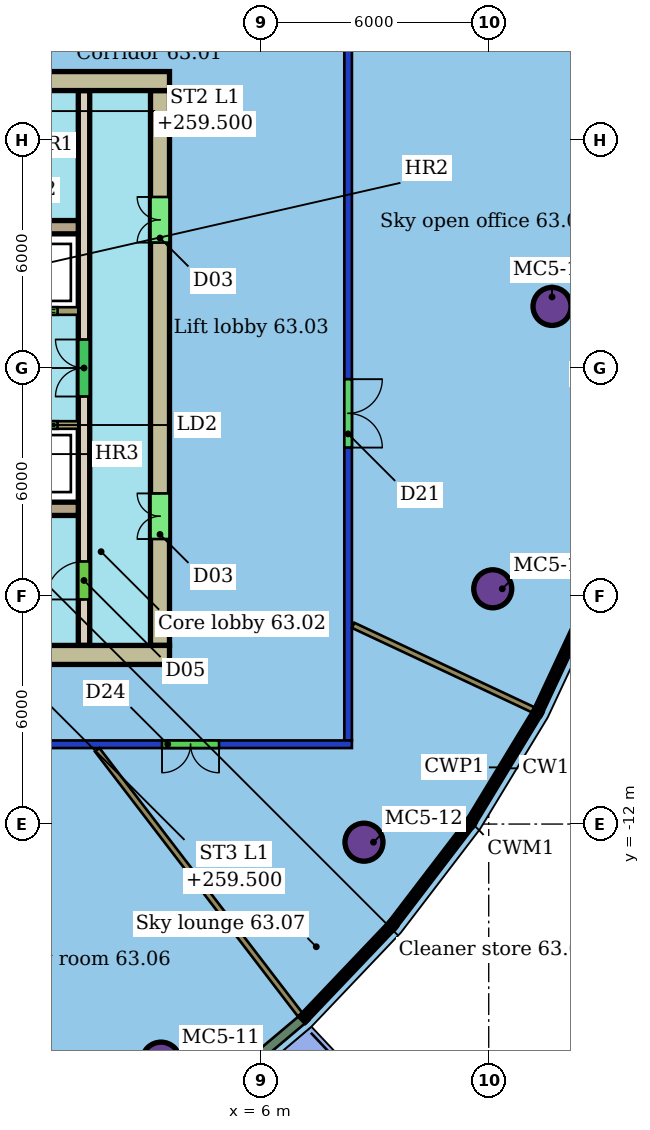
"""IFC4 building model, lengths in metres.
Left out: names, types, materials, properties, quantities, classifications, styles, units other than length and angle.
Written with IfcOpenShell. Run it as: python <this file> out.ifc"""

import sys

from ifc_helpers import new_model, si_unit, direction, frame, frame_2d, origin, origin_2d, place, context, subcontext, project, spatial, rectangle, hollow_circle, extrude, element, fill, save


model = new_model("IFC4")
c1 = context("Model", 3, precision=1e-05, world=origin(), true_north=direction((0.0, 1.0)))
c2 = subcontext(c1, "Body", "Model", "MODEL_VIEW")
j1 = project(units=[si_unit("LENGTHUNIT", "METRE"), si_unit("PLANEANGLEUNIT", "RADIAN")], contexts=[c1])
p1 = place(None, origin())
s1 = spatial("IfcSite", under=j1, at=p1, CompositionType="ELEMENT")
p2 = place(p1, origin())
s2 = spatial("IfcBuilding", under=s1, at=p2, CompositionType="ELEMENT")
p3 = place(p2, frame((0.0, 0.0, 257.7)))
s3 = spatial("IfcBuildingStorey", under=s2, at=p3, CompositionType="ELEMENT", Elevation=257.7)
for number, where, z_axis, x_axis in (
    (1, (3.377, -18.238, 0.0), (0.0, 0.0, 1.0), (1.0, 0.0, 0.0)),
    (2, (8.718, -12.477, 0.0), (0.0, 0.0, 1.0), (1.0, 0.0, 0.0)),
    (3, (12.106, -5.81, 0.0), (0.0, 0.0, 1.0), (1.0, 0.0, 0.0)),
    (4, (13.666, 1.62, 0.0), (0.0, 0.0, 1.0), (1.0, 0.0, 0.0)),
):
    element("IfcColumn", number, at=place(p3, frame(where, z_axis=z_axis, x_axis=x_axis)), inside=s3, PredefinedType="COLUMN", context=c2, shape_type="SweptSolid", body=[
        extrude(hollow_circle(Radius=0.5, WallThickness=0.04, at=origin_2d()), origin(), (0.0, 0.0, 1.0), 3.45),
    ])
p4 = place(p3, frame((8.4, -9.9, 0.0), z_axis=(0.0, 0.0, 1.0), x_axis=(-1.0, 0.0, 0.0)))
e5 = element("IfcWall", 5, at=p4, inside=s3, PredefinedType="PARTITIONING", context=c2, shape_type="SweptSolid", body=[
    extrude(rectangle(XDim=28.8, YDim=0.2, at=frame_2d((14.4, 0.0))), origin(), (0.0, 0.0, 1.0), 3.1),
])
p5 = place(p4, frame((23.159, 0.0, 0.0)))
e6 = element("IfcOpeningElement", 6, at=p5, cuts=e5, PredefinedType="OPENING", context=c2, shape_type="SweptSolid", body=[
    extrude(rectangle(XDim=1.8, YDim=2.4, at=frame_2d((0.9, 1.2))), frame((0.0, 0.11, 0.0), z_axis=(0.0, -1.0, 0.0), x_axis=(1.0, 0.0, 0.0)), (0.0, 0.0, 1.0), 0.22),
])
p6 = place(p4, frame((17.296, 0.0, 0.0)))
e7 = element("IfcOpeningElement", 7, at=p6, cuts=e5, PredefinedType="OPENING", context=c2, shape_type="SweptSolid", body=[
    extrude(rectangle(XDim=1.5, YDim=2.4, at=frame_2d((0.75, 1.2))), frame((0.0, 0.11, 0.0), z_axis=(0.0, -1.0, 0.0), x_axis=(1.0, 0.0, 0.0)), (0.0, 0.0, 1.0), 0.22),
])
p7 = place(p4, frame((8.284, 0.0, 0.0)))
e8 = element("IfcOpeningElement", 8, at=p7, cuts=e5, PredefinedType="OPENING", context=c2, shape_type="SweptSolid", body=[
    extrude(rectangle(XDim=0.9, YDim=2.1, at=frame_2d((0.45, 1.05))), frame((0.0, 0.11, 0.0), z_axis=(0.0, -1.0, 0.0), x_axis=(1.0, 0.0, 0.0)), (0.0, 0.0, 1.0), 0.22),
])
p8 = place(p4, frame((3.497, 0.0, 0.0)))
e9 = element("IfcOpeningElement", 9, at=p8, cuts=e5, PredefinedType="OPENING", context=c2, shape_type="SweptSolid", body=[
    extrude(rectangle(XDim=1.5, YDim=2.1, at=frame_2d((0.75, 1.05))), frame((0.0, 0.11, 0.0), z_axis=(0.0, -1.0, 0.0), x_axis=(1.0, 0.0, 0.0)), (0.0, 0.0, 1.0), 0.22),
])
p9 = place(p3, frame((8.3, 9.8, 0.0), z_axis=(0.0, 0.0, 1.0), x_axis=(0.0, -1.0, 0.0)))
e10 = element("IfcWall", 10, at=p9, inside=s3, PredefinedType="PARTITIONING", context=c2, shape_type="SweptSolid", body=[
    extrude(rectangle(XDim=19.6, YDim=0.2, at=frame_2d((9.8, 0.0))), origin(), (0.0, 0.0, 1.0), 3.1),
])
p10 = place(p9, frame((10.094, 0.0, 0.0)))
e11 = element("IfcOpeningElement", 11, at=p10, cuts=e10, PredefinedType="OPENING", context=c2, shape_type="SweptSolid", body=[
    extrude(rectangle(XDim=1.8, YDim=2.1, at=frame_2d((0.9, 1.05))), frame((0.0, 0.11, 0.0), z_axis=(0.0, -1.0, 0.0), x_axis=(1.0, 0.0, 0.0)), (0.0, 0.0, 1.0), 0.22),
])
p11 = place(p3, frame((7.042, -17.022, 0.0), z_axis=(0.0, 0.0, 1.0), x_axis=(-0.60820873777, 0.793777129489, 0.0)))
e12 = element("IfcWall", 12, at=p11, inside=s3, PredefinedType="PARTITIONING", context=c2, shape_type="SweptSolid", body=[
    extrude(rectangle(XDim=8.789, YDim=0.15, at=frame_2d((4.394, 0.0))), origin(), (0.0, 0.0, 1.0), 3.45),
])
p12 = place(p3, frame((13.177, -8.997, 0.0), z_axis=(0.0, 0.0, 1.0), x_axis=(-0.90531006568, 0.424751321337, 0.0)))
e13 = element("IfcWall", 13, at=p12, inside=s3, PredefinedType="PARTITIONING", context=c2, shape_type="SweptSolid", body=[
    extrude(rectangle(XDim=5.241, YDim=0.15, at=frame_2d((2.621, 0.0))), origin(), (0.0, 0.0, 1.0), 3.45),
])
p13 = place(p3, frame((4.581, -19.26, 0.0), z_axis=(0.0, 0.0, 1.0), x_axis=(0.764538162014, 0.644578465995, 0.0)))
e14 = element("IfcWall", 14, at=p13, inside=s3, PredefinedType="SOLIDWALL", context=c2, shape_type="SweptSolid", body=[
    extrude(rectangle(XDim=3.277, YDim=0.25, at=frame_2d((1.638, 0.0))), origin(), (0.0, 0.0, 1.0), 3.15),
])
p14 = place(p3, frame((3.6, 7.55, 0.0), z_axis=(0.0, 0.0, 1.0), x_axis=(-1.0, 0.0, 0.0)))
e15 = element("IfcWall", 15, at=p14, inside=s3, PredefinedType="SHEAR", context=c2, shape_type="SweptSolid", body=[
    extrude(rectangle(XDim=9.6, YDim=0.5, at=frame_2d((4.8, 0.0))), origin(), (0.0, 0.0, 1.0), 3.3),
])
p15 = place(p14, frame((3.2, 0.0, 0.0)))
e16 = element("IfcOpeningElement", 16, at=p15, cuts=e15, PredefinedType="OPENING", context=c2, shape_type="SweptSolid", body=[
    extrude(rectangle(XDim=1.2, YDim=2.1, at=frame_2d((0.6, 1.05))), frame((0.0, 0.26, 0.0), z_axis=(0.0, -1.0, 0.0), x_axis=(1.0, 0.0, 0.0)), (0.0, 0.0, 1.0), 0.52),
])
p16 = place(p3, frame((-15.6, -7.55, 0.0), z_axis=(0.0, 0.0, 1.0), x_axis=(1.0, 0.0, 0.0)))
e17 = element("IfcWall", 17, at=p16, inside=s3, PredefinedType="SHEAR", context=c2, shape_type="SweptSolid", body=[
    extrude(rectangle(XDim=19.2, YDim=0.5, at=frame_2d((9.6, 0.0))), origin(), (0.0, 0.0, 1.0), 3.3),
])
p17 = place(p16, frame((3.6, 0.0, 0.0)))
e18 = element("IfcOpeningElement", 18, at=p17, cuts=e17, PredefinedType="OPENING", context=c2, shape_type="SweptSolid", body=[
    extrude(rectangle(XDim=1.2, YDim=2.1, at=frame_2d((0.6, 1.05))), frame((0.0, 0.26, 0.0), z_axis=(0.0, -1.0, 0.0), x_axis=(1.0, 0.0, 0.0)), (0.0, 0.0, 1.0), 0.52),
])
p18 = place(p3, frame((3.35, -7.3, 0.0), z_axis=(0.0, 0.0, 1.0), x_axis=(0.0, 1.0, 0.0)))
e19 = element("IfcWall", 19, at=p18, inside=s3, PredefinedType="SHEAR", context=c2, shape_type="SweptSolid", body=[
    extrude(rectangle(XDim=14.6, YDim=0.5, at=frame_2d((7.3, 0.0))), origin(), (0.0, 0.0, 1.0), 3.3),
])
p19 = place(p18, frame((2.8, 0.0, 0.0)))
e20 = element("IfcOpeningElement", 20, at=p19, cuts=e19, PredefinedType="OPENING", context=c2, shape_type="SweptSolid", body=[
    extrude(rectangle(XDim=1.2, YDim=2.1, at=frame_2d((0.6, 1.05))), frame((0.0, 0.26, 0.0), z_axis=(0.0, -1.0, 0.0), x_axis=(1.0, 0.0, 0.0)), (0.0, 0.0, 1.0), 0.52),
])
p20 = place(p18, frame((10.6, 0.0, 0.0)))
e21 = element("IfcOpeningElement", 21, at=p20, cuts=e19, PredefinedType="OPENING", context=c2, shape_type="SweptSolid", body=[
    extrude(rectangle(XDim=1.2, YDim=2.1, at=frame_2d((0.6, 1.05))), frame((0.0, 0.26, 0.0), z_axis=(0.0, -1.0, 0.0), x_axis=(1.0, 0.0, 0.0)), (0.0, 0.0, 1.0), 0.52),
])
for number, where, z_axis, x_axis in (
    (22, (-6.0, 3.705, 0.0), (0.0, 0.0, 1.0), (1.0, 0.0, 0.0)),
    (23, (-6.0, -3.705, 0.0), (0.0, 0.0, 1.0), (1.0, 0.0, 0.0)),
):
    element("IfcWall", number, at=place(p3, frame(where, z_axis=z_axis, x_axis=x_axis)), inside=s3, PredefinedType="SHEAR", context=c2, shape_type="SweptSolid", body=[
        extrude(rectangle(XDim=7.2, YDim=0.35, at=frame_2d((3.6, 0.0))), origin(), (0.0, 0.0, 1.0), 3.3),
    ])
p21 = place(p3, frame((1.35, -7.3, 0.0), z_axis=(0.0, 0.0, 1.0), x_axis=(0.0, 1.0, 0.0)))
e24 = element("IfcWall", 24, at=p21, inside=s3, PredefinedType="SHEAR", context=c2, shape_type="SweptSolid", body=[
    extrude(rectangle(XDim=14.6, YDim=0.3, at=frame_2d((7.3, 0.0))), origin(), (0.0, 0.0, 1.0), 3.3),
])
p22 = place(p21, frame((1.21, 0.0, 0.0)))
e25 = element("IfcOpeningElement", 25, at=p22, cuts=e24, PredefinedType="OPENING", context=c2, shape_type="SweptSolid", body=[
    extrude(rectangle(XDim=1.0, YDim=2.1, at=frame_2d((0.5, 1.05))), frame((0.0, 0.16, 0.0), z_axis=(0.0, -1.0, 0.0), x_axis=(1.0, 0.0, 0.0)), (0.0, 0.0, 1.0), 0.32),
])
p23 = place(p21, frame((6.55, 0.0, 0.0)))
e26 = element("IfcOpeningElement", 26, at=p23, cuts=e24, PredefinedType="OPENING", context=c2, shape_type="SweptSolid", body=[
    extrude(rectangle(XDim=1.5, YDim=2.1, at=frame_2d((0.75, 1.05))), frame((0.0, 0.16, 0.0), z_axis=(0.0, -1.0, 0.0), x_axis=(1.0, 0.0, 0.0)), (0.0, 0.0, 1.0), 0.32),
])
p24 = place(p3, frame((-13.2, 1.5, 0.0), z_axis=(0.0, 0.0, 1.0), x_axis=(1.0, 0.0, 0.0)))
e27 = element("IfcWall", 27, at=p24, inside=s3, PredefinedType="SHEAR", context=c2, shape_type="SweptSolid", body=[
    extrude(rectangle(XDim=14.4, YDim=0.2, at=frame_2d((7.2, 0.0))), origin(), (0.0, 0.0, 1.0), 3.3),
])
p25 = place(p24, frame((10.312, 0.0, 0.0)))
e28 = element("IfcOpeningElement", 28, at=p25, cuts=e27, PredefinedType="OPENING", context=c2, shape_type="SweptSolid", body=[
    extrude(rectangle(XDim=1.1, YDim=2.1, at=frame_2d((0.55, 1.05))), frame((0.0, 0.11, 0.0), z_axis=(0.0, -1.0, 0.0), x_axis=(1.0, 0.0, 0.0)), (0.0, 0.0, 1.0), 0.22),
])
p26 = place(p24, frame((12.754, 0.0, 0.0)))
e29 = element("IfcOpeningElement", 29, at=p26, cuts=e27, PredefinedType="OPENING", context=c2, shape_type="SweptSolid", body=[
    extrude(rectangle(XDim=1.1, YDim=2.1, at=frame_2d((0.55, 1.05))), frame((0.0, 0.11, 0.0), z_axis=(0.0, -1.0, 0.0), x_axis=(1.0, 0.0, 0.0)), (0.0, 0.0, 1.0), 0.22),
])
p27 = place(p24, frame((0.15, 0.0, 0.0)))
e30 = element("IfcOpeningElement", 30, at=p27, cuts=e27, PredefinedType="OPENING", context=c2, shape_type="SweptSolid", body=[
    extrude(rectangle(XDim=0.9, YDim=2.1, at=frame_2d((0.45, 1.05))), frame((0.0, 0.11, 0.0), z_axis=(0.0, -1.0, 0.0), x_axis=(1.0, 0.0, 0.0)), (0.0, 0.0, 1.0), 0.22),
])
p28 = place(p24, frame((4.222, 0.0, 0.0)))
e31 = element("IfcOpeningElement", 31, at=p28, cuts=e27, PredefinedType="OPENING", context=c2, shape_type="SweptSolid", body=[
    extrude(rectangle(XDim=0.9, YDim=2.1, at=frame_2d((0.45, 1.05))), frame((0.0, 0.11, 0.0), z_axis=(0.0, -1.0, 0.0), x_axis=(1.0, 0.0, 0.0)), (0.0, 0.0, 1.0), 0.22),
])
p29 = place(p24, frame((8.367, 0.0, 0.0)))
e32 = element("IfcOpeningElement", 32, at=p29, cuts=e27, PredefinedType="OPENING", context=c2, shape_type="SweptSolid", body=[
    extrude(rectangle(XDim=1.0, YDim=2.1, at=frame_2d((0.5, 1.05))), frame((0.0, 0.11, 0.0), z_axis=(0.0, -1.0, 0.0), x_axis=(1.0, 0.0, 0.0)), (0.0, 0.0, 1.0), 0.22),
])
p30 = place(p3, frame((1.2, -1.5, 0.0), z_axis=(0.0, 0.0, 1.0), x_axis=(-1.0, 0.0, 0.0)))
e33 = element("IfcWall", 33, at=p30, inside=s3, PredefinedType="SHEAR", context=c2, shape_type="SweptSolid", body=[
    extrude(rectangle(XDim=14.4, YDim=0.2, at=frame_2d((7.2, 0.0))), origin(), (0.0, 0.0, 1.0), 3.3),
])
p31 = place(p30, frame((7.821, 0.0, 0.0)))
e34 = element("IfcOpeningElement", 34, at=p31, cuts=e33, PredefinedType="OPENING", context=c2, shape_type="SweptSolid", body=[
    extrude(rectangle(XDim=1.2, YDim=2.1, at=frame_2d((0.6, 1.05))), frame((0.0, 0.11, 0.0), z_axis=(0.0, -1.0, 0.0), x_axis=(1.0, 0.0, 0.0)), (0.0, 0.0, 1.0), 0.22),
])
p32 = place(p30, frame((0.546, 0.0, 0.0)))
e35 = element("IfcOpeningElement", 35, at=p32, cuts=e33, PredefinedType="OPENING", context=c2, shape_type="SweptSolid", body=[
    extrude(rectangle(XDim=1.1, YDim=2.1, at=frame_2d((0.55, 1.05))), frame((0.0, 0.11, 0.0), z_axis=(0.0, -1.0, 0.0), x_axis=(1.0, 0.0, 0.0)), (0.0, 0.0, 1.0), 0.22),
])
p33 = place(p30, frame((4.983, 0.0, 0.0)))
e36 = element("IfcOpeningElement", 36, at=p33, cuts=e33, PredefinedType="OPENING", context=c2, shape_type="SweptSolid", body=[
    extrude(rectangle(XDim=1.0, YDim=2.1, at=frame_2d((0.5, 1.05))), frame((0.0, 0.11, 0.0), z_axis=(0.0, -1.0, 0.0), x_axis=(1.0, 0.0, 0.0)), (0.0, 0.0, 1.0), 0.22),
])
p34 = place(p30, frame((2.592, 0.0, 0.0)))
e37 = element("IfcOpeningElement", 37, at=p34, cuts=e33, PredefinedType="OPENING", context=c2, shape_type="SweptSolid", body=[
    extrude(rectangle(XDim=1.0, YDim=2.1, at=frame_2d((0.5, 1.05))), frame((0.0, 0.11, 0.0), z_axis=(0.0, -1.0, 0.0), x_axis=(1.0, 0.0, 0.0)), (0.0, 0.0, 1.0), 0.22),
])
p35 = place(p8, origin())
e38 = element("IfcDoor", 38, at=p35, inside=s3, OperationType="DOUBLE_DOOR_SINGLE_SWING", PredefinedType="DOOR", context=c2, shape_type="SweptSolid", body=[
    extrude(rectangle(XDim=1.5, YDim=2.1, at=frame_2d((0.75, 1.05))), frame((0.0, 0.025, 0.0), z_axis=(0.0, -1.0, 0.0), x_axis=(1.0, 0.0, 0.0)), (0.0, 0.0, 1.0), 0.05),
])
fill(e9, e38)
p36 = place(p10, origin())
e39 = element("IfcDoor", 39, at=p36, inside=s3, OperationType="DOUBLE_DOOR_SINGLE_SWING", PredefinedType="DOOR", context=c2, shape_type="SweptSolid", body=[
    extrude(rectangle(XDim=1.8, YDim=2.1, at=frame_2d((0.9, 1.05))), frame((0.0, 0.025, 0.0), z_axis=(0.0, -1.0, 0.0), x_axis=(1.0, 0.0, 0.0)), (0.0, 0.0, 1.0), 0.05),
])
fill(e11, e39)
p37 = place(p19, origin())
e40 = element("IfcDoor", 40, at=p37, inside=s3, OperationType="DOUBLE_DOOR_SINGLE_SWING", PredefinedType="NOTDEFINED", context=c2, shape_type="SweptSolid", body=[
    extrude(rectangle(XDim=1.2, YDim=2.1, at=frame_2d((0.6, 1.05))), frame((0.0, 0.025, 0.0), z_axis=(0.0, -1.0, 0.0), x_axis=(1.0, 0.0, 0.0)), (0.0, 0.0, 1.0), 0.05),
])
fill(e20, e40)
p38 = place(p20, origin())
e41 = element("IfcDoor", 41, at=p38, inside=s3, OperationType="DOUBLE_DOOR_SINGLE_SWING", PredefinedType="NOTDEFINED", context=c2, shape_type="SweptSolid", body=[
    extrude(rectangle(XDim=1.2, YDim=2.1, at=frame_2d((0.6, 1.05))), frame((0.0, 0.025, 0.0), z_axis=(0.0, -1.0, 0.0), x_axis=(1.0, 0.0, 0.0)), (0.0, 0.0, 1.0), 0.05),
])
fill(e21, e41)
p39 = place(p22, origin())
e42 = element("IfcDoor", 42, at=p39, inside=s3, OperationType="SINGLE_SWING_LEFT", PredefinedType="NOTDEFINED", context=c2, shape_type="SweptSolid", body=[
    extrude(rectangle(XDim=1.0, YDim=2.1, at=frame_2d((0.5, 1.05))), frame((0.0, 0.025, 0.0), z_axis=(0.0, -1.0, 0.0), x_axis=(1.0, 0.0, 0.0)), (0.0, 0.0, 1.0), 0.05),
])
fill(e25, e42)
p40 = place(p23, origin())
e43 = element("IfcDoor", 43, at=p40, inside=s3, OperationType="DOUBLE_DOOR_SINGLE_SWING", PredefinedType="NOTDEFINED", context=c2, shape_type="SweptSolid", body=[
    extrude(rectangle(XDim=1.5, YDim=2.1, at=frame_2d((0.75, 1.05))), frame((0.0, 0.025, 0.0), z_axis=(0.0, -1.0, 0.0), x_axis=(1.0, 0.0, 0.0)), (0.0, 0.0, 1.0), 0.05),
])
fill(e26, e43)
p41 = place(p26, origin())
e44 = element("IfcDoor", 44, at=p41, inside=s3, OperationType="DOUBLE_DOOR_SLIDING", PredefinedType="NOTDEFINED", context=c2, shape_type="SweptSolid", body=[
    extrude(rectangle(XDim=1.1, YDim=2.1, at=frame_2d((0.55, 1.05))), frame((0.0, 0.025, 0.0), z_axis=(0.0, -1.0, 0.0), x_axis=(1.0, 0.0, 0.0)), (0.0, 0.0, 1.0), 0.05),
])
fill(e29, e44)
p42 = place(p32, origin())
e45 = element("IfcDoor", 45, at=p42, inside=s3, OperationType="DOUBLE_DOOR_SLIDING", PredefinedType="NOTDEFINED", context=c2, shape_type="SweptSolid", body=[
    extrude(rectangle(XDim=1.1, YDim=2.1, at=frame_2d((0.55, 1.05))), frame((0.0, 0.025, 0.0), z_axis=(0.0, -1.0, 0.0), x_axis=(1.0, 0.0, 0.0)), (0.0, 0.0, 1.0), 0.05),
])
fill(e35, e45)
save(model, sys.argv[1])
